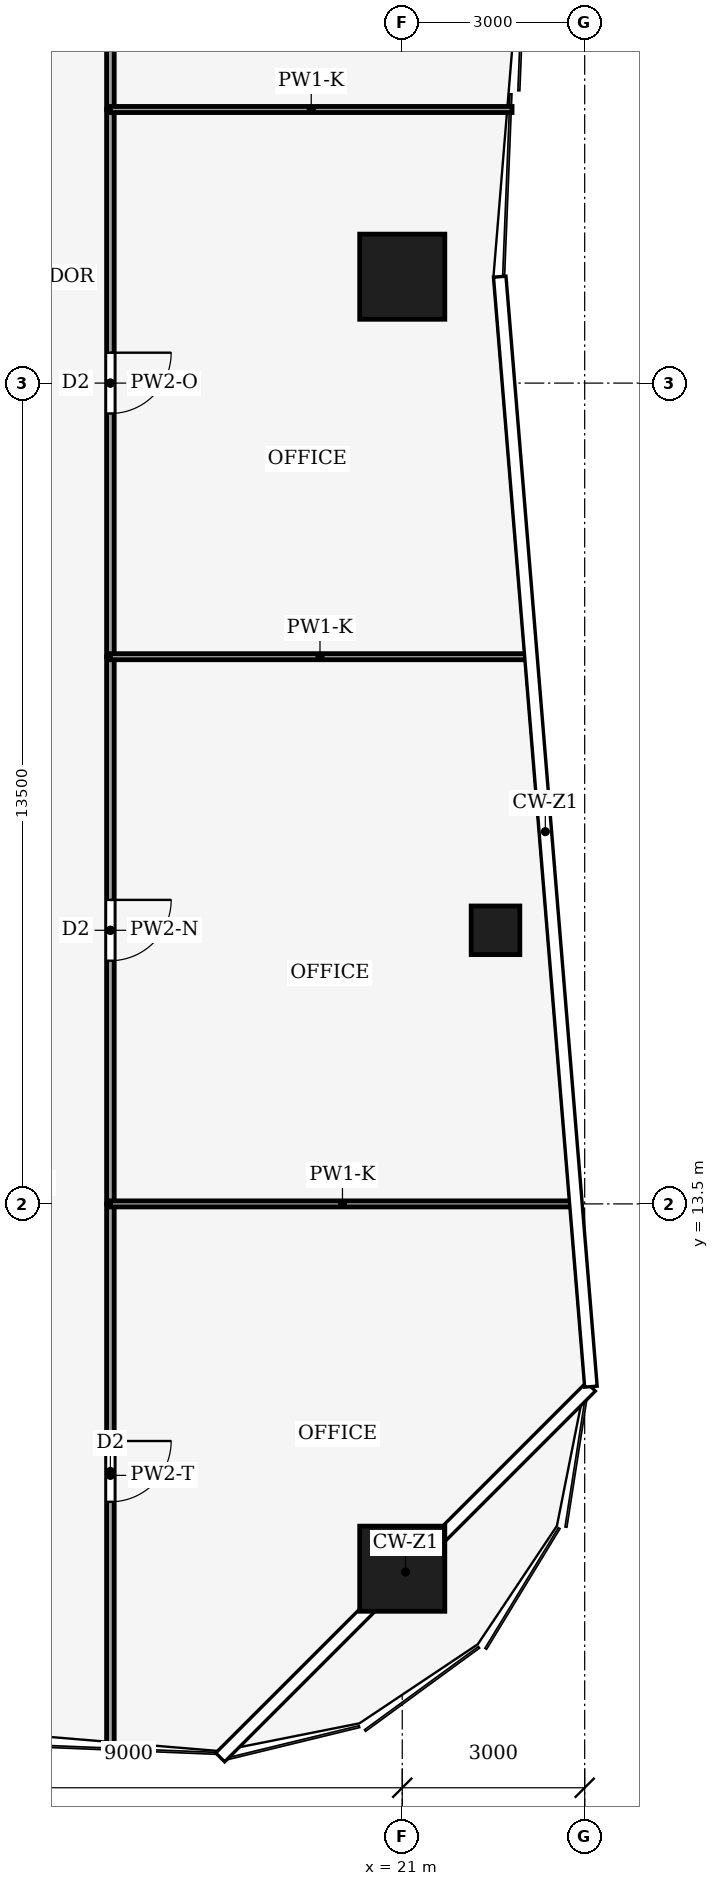
"""IFC4 building model, lengths in metres.
Left out: names, types, materials, properties, quantities, classifications, styles, units other than length and angle.
Written with IfcOpenShell. Run it as: python <this file> out.ifc"""

import sys

from ifc_helpers import new_model, si_unit, direction, frame, frame_2d, origin, origin_2d, place, context, subcontext, project, spatial, rectangle, hollow_rectangle, extrude, element, fill, save


model = new_model("IFC4")
c1 = context("Model", 3, precision=1e-05, world=origin(), true_north=direction((0.0, 1.0)))
c2 = subcontext(c1, "Body", "Model", "MODEL_VIEW")
j1 = project(units=[si_unit("LENGTHUNIT", "METRE"), si_unit("PLANEANGLEUNIT", "RADIAN")], contexts=[c1])
p1 = place(None, origin())
s1 = spatial("IfcSite", under=j1, at=p1, CompositionType="ELEMENT")
p2 = place(p1, origin())
s2 = spatial("IfcBuilding", under=s1, at=p2, CompositionType="ELEMENT")
p3 = place(p2, frame((0.0, 0.0, 110.0)))
s3 = spatial("IfcBuildingStorey", under=s2, at=p3, CompositionType="ELEMENT", Elevation=110.0)
for number, where, z_axis, x_axis in (
    (1, (21.0, 28.75, 0.0), (0.0, 0.0, 1.0), (1.0, 0.0, 0.0)),
    (2, (21.0, 7.5, 0.0), (0.0, 0.0, 1.0), (1.0, 0.0, 0.0)),
):
    element("IfcColumn", number, at=place(p3, frame(where, z_axis=z_axis, x_axis=x_axis)), inside=s3, PredefinedType="COLUMN", context=c2, shape_type="SweptSolid", body=[
        extrude(hollow_rectangle(XDim=1.4, YDim=1.4, WallThickness=0.08, at=origin_2d()), origin(), (0.0, 0.0, 1.0), 4.0),
    ])
p4 = place(p3, frame((22.534, 18.0, 0.0), z_axis=(0.0, 0.0, 1.0), x_axis=(1.0, 0.0, 0.0)))
e3 = element("IfcColumn", 3, at=p4, inside=s3, PredefinedType="COLUMN", context=c2, shape_type="SweptSolid", body=[
    extrude(hollow_rectangle(XDim=0.8, YDim=0.8, WallThickness=0.04, at=origin_2d()), origin(), (0.0, 0.0, 1.0), 4.0),
])
p5 = place(p3, frame((16.2, 13.5, 0.0), z_axis=(0.0, 0.0, 1.0), x_axis=(0.0, -1.0, 0.0)))
e4 = element("IfcWall", 4, at=p5, inside=s3, PredefinedType="PARTITIONING", context=c2, shape_type="SweptSolid", body=[
    extrude(rectangle(XDim=8.93, YDim=0.125, at=frame_2d((4.465, 0.0))), origin(), (0.0, 0.0, 1.0), 2.92),
])
p6 = place(p5, frame((3.9, 0.0, 0.0)))
e5 = element("IfcOpeningElement", 5, at=p6, cuts=e4, PredefinedType="OPENING", context=c2, shape_type="SweptSolid", body=[
    extrude(rectangle(XDim=1.0, YDim=2.1, at=frame_2d((0.5, 1.05))), frame((0.0, 0.073, 0.0), z_axis=(0.0, -1.0, 0.0), x_axis=(1.0, 0.0, 0.0)), (0.0, 0.0, 1.0), 0.145),
])
p7 = place(p3, frame((16.2, 22.5, 0.0), z_axis=(0.0, 0.0, 1.0), x_axis=(0.0, -1.0, 0.0)))
e6 = element("IfcWall", 6, at=p7, inside=s3, PredefinedType="PARTITIONING", context=c2, shape_type="SweptSolid", body=[
    extrude(rectangle(XDim=9.0, YDim=0.125, at=frame_2d((4.5, 0.0))), origin(), (0.0, 0.0, 1.0), 3.02),
])
p8 = place(p7, frame((4.0, 0.0, 0.0)))
e7 = element("IfcOpeningElement", 7, at=p8, cuts=e6, PredefinedType="OPENING", context=c2, shape_type="SweptSolid", body=[
    extrude(rectangle(XDim=1.0, YDim=2.1, at=frame_2d((0.5, 1.05))), frame((0.0, 0.073, 0.0), z_axis=(0.0, -1.0, 0.0), x_axis=(1.0, 0.0, 0.0)), (0.0, 0.0, 1.0), 0.145),
])
p9 = place(p3, frame((16.2, 31.5, 0.0), z_axis=(0.0, 0.0, 1.0), x_axis=(0.0, -1.0, 0.0)))
e8 = element("IfcWall", 8, at=p9, inside=s3, PredefinedType="PARTITIONING", context=c2, shape_type="SweptSolid", body=[
    extrude(rectangle(XDim=9.0, YDim=0.125, at=frame_2d((4.5, 0.0))), origin(), (0.0, 0.0, 1.0), 3.36),
])
p10 = place(p9, frame((4.0, 0.0, 0.0)))
e9 = element("IfcOpeningElement", 9, at=p10, cuts=e8, PredefinedType="OPENING", context=c2, shape_type="SweptSolid", body=[
    extrude(rectangle(XDim=1.0, YDim=2.1, at=frame_2d((0.5, 1.05))), frame((0.0, 0.073, 0.0), z_axis=(0.0, -1.0, 0.0), x_axis=(1.0, 0.0, 0.0)), (0.0, 0.0, 1.0), 0.145),
])
p11 = place(p3, frame((16.2, 40.5, 0.0), z_axis=(0.0, 0.0, 1.0), x_axis=(0.0, -1.0, 0.0)))
e10 = element("IfcWall", 10, at=p11, inside=s3, PredefinedType="PARTITIONING", context=c2, shape_type="SweptSolid", body=[
    extrude(rectangle(XDim=9.0, YDim=0.125, at=frame_2d((4.5, 0.0))), origin(), (0.0, 0.0, 1.0), 3.02),
])
p12 = place(p11, frame((4.0, 0.0, 0.0)))
e11 = element("IfcOpeningElement", 11, at=p12, cuts=e10, PredefinedType="OPENING", context=c2, shape_type="SweptSolid", body=[
    extrude(rectangle(XDim=1.0, YDim=2.1, at=frame_2d((0.5, 1.05))), frame((0.0, 0.073, 0.0), z_axis=(0.0, -1.0, 0.0), x_axis=(1.0, 0.0, 0.0)), (0.0, 0.0, 1.0), 0.145),
])
p13 = place(p3, frame((23.833, 13.5, 0.0), z_axis=(0.0, 0.0, 1.0), x_axis=(-1.0, 0.0, 0.0)))
e12 = element("IfcWall", 12, at=p13, inside=s3, PredefinedType="PARTITIONING", context=c2, shape_type="SweptSolid", body=[
    extrude(rectangle(XDim=7.634, YDim=0.1, at=frame_2d((3.817, 0.0))), origin(), (0.0, 0.0, 1.0), 2.92),
])
p14 = place(p3, frame((23.094, 22.5, 0.0), z_axis=(0.0, 0.0, 1.0), x_axis=(-1.0, 0.0, 0.0)))
e13 = element("IfcWall", 13, at=p14, inside=s3, PredefinedType="PARTITIONING", context=c2, shape_type="SweptSolid", body=[
    extrude(rectangle(XDim=6.894, YDim=0.1, at=frame_2d((3.447, 0.0))), origin(), (0.0, 0.0, 1.0), 2.92),
])
p15 = place(p3, frame((22.806, 31.5, 0.0), z_axis=(0.0, 0.0, 1.0), x_axis=(-1.0, 0.0, 0.0)))
e14 = element("IfcWall", 14, at=p15, inside=s3, PredefinedType="PARTITIONING", context=c2, shape_type="SweptSolid", body=[
    extrude(rectangle(XDim=6.606, YDim=0.1, at=frame_2d((3.303, 0.0))), origin(), (0.0, 0.0, 1.0), 2.92),
])
p16 = place(p6, origin())
e15 = element("IfcDoor", 15, at=p16, inside=s3, OperationType="SINGLE_SWING_LEFT", PredefinedType="DOOR", context=c2, shape_type="SweptSolid", body=[
    extrude(rectangle(XDim=1.0, YDim=2.1, at=frame_2d((0.5, 1.05))), frame((0.0, 0.025, 0.0), z_axis=(0.0, -1.0, 0.0), x_axis=(1.0, 0.0, 0.0)), (0.0, 0.0, 1.0), 0.05),
])
fill(e5, e15)
p17 = place(p8, origin())
e16 = element("IfcDoor", 16, at=p17, inside=s3, OperationType="SINGLE_SWING_LEFT", PredefinedType="DOOR", context=c2, shape_type="SweptSolid", body=[
    extrude(rectangle(XDim=1.0, YDim=2.1, at=frame_2d((0.5, 1.05))), frame((0.0, 0.025, 0.0), z_axis=(0.0, -1.0, 0.0), x_axis=(1.0, 0.0, 0.0)), (0.0, 0.0, 1.0), 0.05),
])
fill(e7, e16)
p18 = place(p10, origin())
e17 = element("IfcDoor", 17, at=p18, inside=s3, OperationType="SINGLE_SWING_RIGHT", PredefinedType="DOOR", context=c2, shape_type="SweptSolid", body=[
    extrude(rectangle(XDim=1.0, YDim=2.1, at=frame_2d((0.5, 1.05))), frame((0.0, 0.025, 0.0), z_axis=(0.0, -1.0, 0.0), x_axis=(1.0, 0.0, 0.0)), (0.0, 0.0, 1.0), 0.05),
])
fill(e9, e17)
save(model, sys.argv[1])
